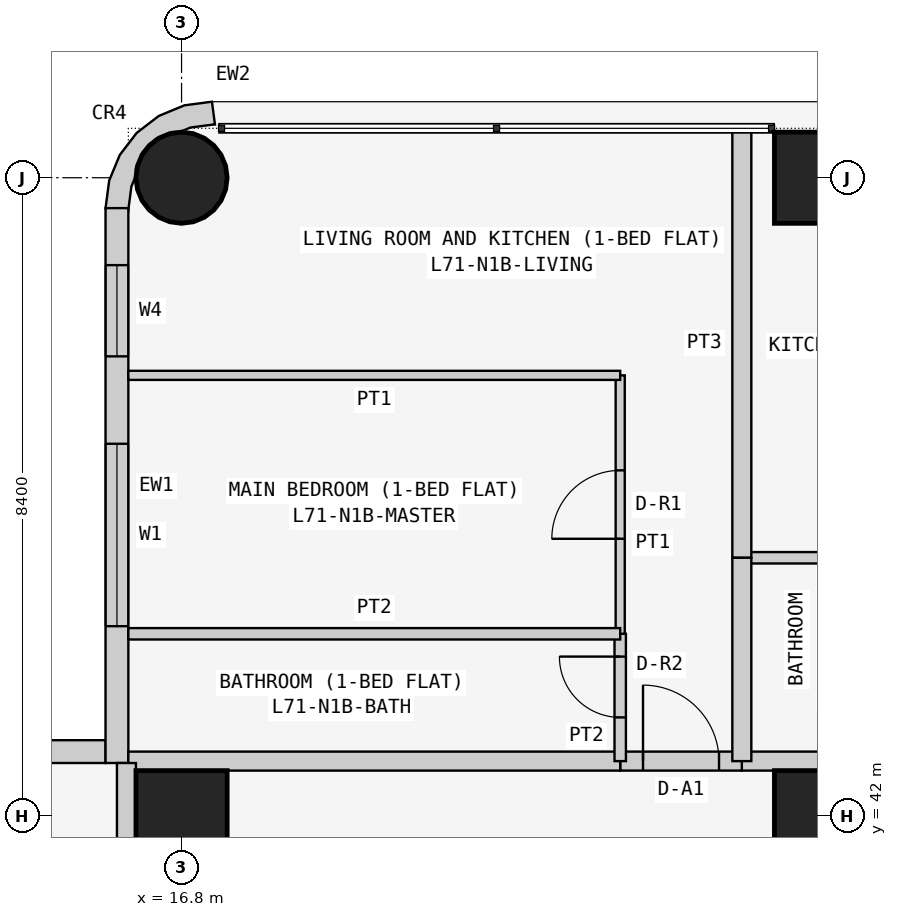
"""IFC4 building model, lengths in metres.
Left out: names, types, materials, properties, quantities, classifications, styles, units other than length and angle.
Written with IfcOpenShell. Run it as: python <this file> out.ifc"""

import sys

from ifc_helpers import new_model, si_unit, direction, frame, frame_2d, origin, origin_2d, place, context, subcontext, project, spatial, polyline, rectangle, circle, outline, extrude, element, fill, save


model = new_model("IFC4")
c1 = context("Model", 3, precision=1e-05, world=origin(), true_north=direction((0.0, 1.0)))
c2 = subcontext(c1, "Body", "Model", "MODEL_VIEW")
j1 = project(units=[si_unit("LENGTHUNIT", "METRE"), si_unit("PLANEANGLEUNIT", "RADIAN")], contexts=[c1])
p1 = place(None, origin())
s1 = spatial("IfcSite", under=j1, at=p1, CompositionType="ELEMENT")
p2 = place(p1, origin())
s2 = spatial("IfcBuilding", under=s1, at=p2, CompositionType="ELEMENT")
p3 = place(p2, frame((0.0, 0.0, 272.1)))
s3 = spatial("IfcBuildingStorey", under=s2, at=p3, CompositionType="ELEMENT", Elevation=272.1)
p4 = place(p3, frame((16.8, 42.0, 0.0), z_axis=(0.0, 0.0, 1.0), x_axis=(1.0, 0.0, 0.0)))
e1 = element("IfcColumn", 1, at=p4, inside=s3, PredefinedType="COLUMN", context=c2, shape_type="SweptSolid", body=[
    extrude(rectangle(XDim=1.2, YDim=1.2, at=origin_2d()), origin(), (0.0, 0.0, 1.0), 3.6),
])
p5 = place(p3, frame((16.8, 50.4, 0.0), z_axis=(0.0, 0.0, 1.0), x_axis=(1.0, 0.0, 0.0)))
e2 = element("IfcColumn", 2, at=p5, inside=s3, PredefinedType="COLUMN", context=c2, shape_type="SweptSolid", body=[
    extrude(circle(Radius=0.6, at=origin_2d()), origin(), (0.0, 0.0, 1.0), 3.6),
])
for number, where, z_axis, x_axis in (
    (3, (25.2, 42.0, 0.0), (0.0, 0.0, 1.0), (1.0, 0.0, 0.0)),
    (4, (25.2, 50.4, 0.0), (0.0, 0.0, 1.0), (1.0, 0.0, 0.0)),
):
    element("IfcColumn", number, at=place(p3, frame(where, z_axis=z_axis, x_axis=x_axis)), inside=s3, PredefinedType="COLUMN", context=c2, shape_type="SweptSolid", body=[
        extrude(rectangle(XDim=1.2, YDim=1.2, at=origin_2d()), origin(), (0.0, 0.0, 1.0), 3.6),
    ])
p6 = place(p3, frame((15.8, 42.85, 0.0), z_axis=(0.0, 0.0, 1.0), x_axis=(-1.0, 0.0, 0.0)))
e5 = element("IfcWall", 5, at=p6, inside=s3, PredefinedType="SOLIDWALL", context=c2, shape_type="SweptSolid", body=[
    extrude(rectangle(XDim=7.0, YDim=0.3, at=frame_2d((3.5, 0.0))), origin(), (0.0, 0.0, 1.0), 3.45),
])
p7 = place(p6, frame((1.5, 0.0, 0.9)))
e6 = element("IfcOpeningElement", 6, at=p7, cuts=e5, PredefinedType="OPENING", context=c2, shape_type="SweptSolid", body=[
    extrude(rectangle(XDim=2.4, YDim=1.5, at=frame_2d((1.2, 0.75))), frame((0.0, 0.16, 0.0), z_axis=(0.0, -1.0, 0.0), x_axis=(1.0, 0.0, 0.0)), (0.0, 0.0, 1.0), 0.32),
])
p8 = place(p6, frame((5.05, 0.0, 0.9)))
e7 = element("IfcOpeningElement", 7, at=p8, cuts=e5, PredefinedType="OPENING", context=c2, shape_type="SweptSolid", body=[
    extrude(rectangle(XDim=1.2, YDim=1.5, at=frame_2d((0.6, 0.75))), frame((0.0, 0.16, 0.0), z_axis=(0.0, -1.0, 0.0), x_axis=(1.0, 0.0, 0.0)), (0.0, 0.0, 1.0), 0.32),
])
p9 = place(p3, frame((15.95, 50.0, 0.0), z_axis=(0.0, 0.0, 1.0), x_axis=(0.0, -1.0, 0.0)))
e8 = element("IfcWall", 8, at=p9, inside=s3, PredefinedType="SOLIDWALL", context=c2, shape_type="SweptSolid", body=[
    extrude(rectangle(XDim=7.3, YDim=0.3, at=frame_2d((3.65, 0.0))), origin(), (0.0, 0.0, 1.0), 3.45),
])
p10 = place(p9, frame((3.1, 0.0, 0.9)))
e9 = element("IfcOpeningElement", 9, at=p10, cuts=e8, PredefinedType="OPENING", context=c2, shape_type="SweptSolid", body=[
    extrude(rectangle(XDim=2.4, YDim=1.5, at=frame_2d((1.2, 0.75))), frame((0.0, 0.16, 0.0), z_axis=(0.0, -1.0, 0.0), x_axis=(1.0, 0.0, 0.0)), (0.0, 0.0, 1.0), 0.32),
])
p11 = place(p9, frame((0.75, 0.0, 0.9)))
e10 = element("IfcOpeningElement", 10, at=p11, cuts=e8, PredefinedType="OPENING", context=c2, shape_type="SweptSolid", body=[
    extrude(rectangle(XDim=1.2, YDim=1.5, at=frame_2d((0.6, 0.75))), frame((0.0, 0.16, 0.0), z_axis=(0.0, -1.0, 0.0), x_axis=(1.0, 0.0, 0.0)), (0.0, 0.0, 1.0), 0.32),
])
p12 = place(p3, frame((17.162, 50.976, 0.0), z_axis=(0.0, 0.0, 1.0), x_axis=(-0.707106781187, 0.707106781187, 0.0)))
e11 = element("IfcWall", 11, at=p12, inside=s3, PredefinedType="SOLIDWALL", context=c2, shape_type="SweptSolid", body=[
    extrude(outline(polyline([(0.047, -0.129), (0.033, -0.143), (0.273, -0.327), (0.495, -0.037), (0.635, 0.301), (0.683, 0.663), (0.635, 1.025), (0.495, 1.363), (0.273, 1.653), (0.033, 1.469), (0.047, 1.455), (0.233, 1.212), (0.292, 1.069), (0.358, 1.003), (0.449, 0.782), (0.449, 0.543), (0.358, 0.322), (0.292, 0.257), (0.233, 0.114), (0.047, -0.129)])), origin(), (0.0, 0.0, 1.0), 3.45),
])
p13 = place(p3, frame((24.171, 42.725, 0.0), z_axis=(0.0, 0.0, 1.0), x_axis=(1.0, 0.0, 0.0)))
e12 = element("IfcWall", 12, at=p13, inside=s3, PredefinedType="PARTITIONING", context=c2, shape_type="SweptSolid", body=[
    extrude(rectangle(XDim=2.629, YDim=0.25, at=frame_2d((1.314, 0.0))), origin(), (0.0, 0.0, 1.0), 3.45),
])
p14 = place(p3, frame((22.571, 42.725, 0.0), z_axis=(0.0, 0.0, 1.0), x_axis=(1.0, 0.0, 0.0)))
e13 = element("IfcWall", 13, at=p14, inside=s3, PredefinedType="PARTITIONING", context=c2, shape_type="SweptSolid", body=[
    extrude(rectangle(XDim=1.6, YDim=0.25, at=frame_2d((0.8, 0.0))), origin(), (0.0, 0.0, 1.0), 3.45),
])
p15 = place(p14, frame((0.3, 0.0, 0.0)))
e14 = element("IfcOpeningElement", 14, at=p15, cuts=e13, PredefinedType="OPENING", context=c2, shape_type="SweptSolid", body=[
    extrude(rectangle(XDim=1.0, YDim=2.1, at=frame_2d((0.5, 1.05))), frame((0.0, 0.135, 0.0), z_axis=(0.0, -1.0, 0.0), x_axis=(1.0, 0.0, 0.0)), (0.0, 0.0, 1.0), 0.27),
])
p16 = place(p3, frame((16.1, 42.725, 0.0), z_axis=(0.0, 0.0, 1.0), x_axis=(1.0, 0.0, 0.0)))
e15 = element("IfcWall", 15, at=p16, inside=s3, PredefinedType="PARTITIONING", context=c2, shape_type="SweptSolid", body=[
    extrude(rectangle(XDim=6.471, YDim=0.25, at=frame_2d((3.235, 0.0))), origin(), (0.0, 0.0, 1.0), 3.45),
])
p17 = place(p3, frame((16.075, 35.829, 0.0), z_axis=(0.0, 0.0, 1.0), x_axis=(0.0, 1.0, 0.0)))
e16 = element("IfcWall", 16, at=p17, inside=s3, PredefinedType="PARTITIONING", context=c2, shape_type="SweptSolid", body=[
    extrude(rectangle(XDim=6.871, YDim=0.25, at=frame_2d((3.436, 0.0))), origin(), (0.0, 0.0, 1.0), 3.45),
])
p18 = place(p3, frame((26.8, 45.4, 0.0), z_axis=(0.0, 0.0, 1.0), x_axis=(-1.0, 0.0, 0.0)))
e17 = element("IfcWall", 17, at=p18, inside=s3, PredefinedType="PARTITIONING", context=c2, shape_type="SweptSolid", body=[
    extrude(rectangle(XDim=2.629, YDim=0.15, at=frame_2d((1.314, 0.0))), origin(), (0.0, 0.0, 1.0), 3.45),
])
p19 = place(p3, frame((24.171, 45.4, 0.0), z_axis=(0.0, 0.0, 1.0), x_axis=(0.0, 1.0, 0.0)))
e18 = element("IfcWall", 18, at=p19, inside=s3, PredefinedType="PARTITIONING", context=c2, shape_type="SweptSolid", body=[
    extrude(rectangle(XDim=5.65, YDim=0.25, at=frame_2d((2.825, 0.0))), origin(), (0.0, 0.0, 1.0), 3.45),
])
p20 = place(p3, frame((24.171, 45.4, 0.0), z_axis=(0.0, 0.0, 1.0), x_axis=(0.0, -1.0, 0.0)))
e19 = element("IfcWall", 19, at=p20, inside=s3, PredefinedType="PARTITIONING", context=c2, shape_type="SweptSolid", body=[
    extrude(rectangle(XDim=2.675, YDim=0.25, at=frame_2d((1.337, 0.0))), origin(), (0.0, 0.0, 1.0), 3.45),
])
p21 = place(p3, frame((22.571, 42.725, 0.0), z_axis=(0.0, 0.0, 1.0), x_axis=(0.0, 1.0, 0.0)))
e20 = element("IfcWall", 20, at=p21, inside=s3, PredefinedType="PARTITIONING", context=c2, shape_type="SweptSolid", body=[
    extrude(rectangle(XDim=1.675, YDim=0.15, at=frame_2d((0.837, 0.0))), origin(), (0.0, 0.0, 1.0), 3.45),
])
p22 = place(p21, frame((0.575, 0.0, 0.0)))
e21 = element("IfcOpeningElement", 21, at=p22, cuts=e20, PredefinedType="OPENING", context=c2, shape_type="SweptSolid", body=[
    extrude(rectangle(XDim=0.8, YDim=2.1, at=frame_2d((0.4, 1.05))), frame((0.0, 0.085, 0.0), z_axis=(0.0, -1.0, 0.0), x_axis=(1.0, 0.0, 0.0)), (0.0, 0.0, 1.0), 0.17),
])
p23 = place(p3, frame((22.571, 44.4, 0.0), z_axis=(0.0, 0.0, 1.0), x_axis=(0.0, 1.0, 0.0)))
e22 = element("IfcWall", 22, at=p23, inside=s3, PredefinedType="PARTITIONING", context=c2, shape_type="SweptSolid", body=[
    extrude(rectangle(XDim=3.4, YDim=0.12, at=frame_2d((1.7, 0.0))), origin(), (0.0, 0.0, 1.0), 3.45),
])
p24 = place(p23, frame((1.25, 0.0, 0.0)))
e23 = element("IfcOpeningElement", 23, at=p24, cuts=e22, PredefinedType="OPENING", context=c2, shape_type="SweptSolid", body=[
    extrude(rectangle(XDim=0.9, YDim=2.1, at=frame_2d((0.45, 1.05))), frame((0.0, 0.07, 0.0), z_axis=(0.0, -1.0, 0.0), x_axis=(1.0, 0.0, 0.0)), (0.0, 0.0, 1.0), 0.14),
])
p25 = place(p3, frame((22.571, 47.8, 0.0), z_axis=(0.0, 0.0, 1.0), x_axis=(-1.0, 0.0, 0.0)))
e24 = element("IfcWall", 24, at=p25, inside=s3, PredefinedType="PARTITIONING", context=c2, shape_type="SweptSolid", body=[
    extrude(rectangle(XDim=6.471, YDim=0.12, at=frame_2d((3.235, 0.0))), origin(), (0.0, 0.0, 1.0), 3.45),
])
p26 = place(p3, frame((22.571, 44.4, 0.0), z_axis=(0.0, 0.0, 1.0), x_axis=(-1.0, 0.0, 0.0)))
e25 = element("IfcWall", 25, at=p26, inside=s3, PredefinedType="PARTITIONING", context=c2, shape_type="SweptSolid", body=[
    extrude(rectangle(XDim=6.471, YDim=0.15, at=frame_2d((3.235, 0.0))), origin(), (0.0, 0.0, 1.0), 3.45),
])
p27 = place(p10, origin())
e26 = element("IfcWindow", 26, at=p27, inside=s3, PartitioningType="SINGLE_PANEL", PredefinedType="WINDOW", context=c2, shape_type="SweptSolid", body=[
    extrude(rectangle(XDim=2.4, YDim=1.5, at=frame_2d((1.2, 0.75))), frame((0.0, 0.03, 0.0), z_axis=(0.0, -1.0, 0.0), x_axis=(1.0, 0.0, 0.0)), (0.0, 0.0, 1.0), 0.06),
])
fill(e9, e26)
p28 = place(p11, origin())
e27 = element("IfcWindow", 27, at=p28, inside=s3, PartitioningType="SINGLE_PANEL", PredefinedType="WINDOW", context=c2, shape_type="SweptSolid", body=[
    extrude(rectangle(XDim=1.2, YDim=1.5, at=frame_2d((0.6, 0.75))), frame((0.0, 0.03, 0.0), z_axis=(0.0, -1.0, 0.0), x_axis=(1.0, 0.0, 0.0)), (0.0, 0.0, 1.0), 0.06),
])
fill(e10, e27)
p29 = place(p15, origin())
e28 = element("IfcDoor", 28, at=p29, inside=s3, OperationType="SINGLE_SWING_LEFT", PredefinedType="DOOR", context=c2, shape_type="SweptSolid", body=[
    extrude(rectangle(XDim=1.0, YDim=2.1, at=frame_2d((0.5, 1.05))), frame((0.0, 0.025, 0.0), z_axis=(0.0, -1.0, 0.0), x_axis=(1.0, 0.0, 0.0)), (0.0, 0.0, 1.0), 0.05),
])
fill(e14, e28)
p30 = place(p22, origin())
e29 = element("IfcDoor", 29, at=p30, inside=s3, OperationType="SINGLE_SWING_RIGHT", PredefinedType="DOOR", context=c2, shape_type="SweptSolid", body=[
    extrude(rectangle(XDim=0.8, YDim=2.1, at=frame_2d((0.4, 1.05))), frame((0.0, 0.025, 0.0), z_axis=(0.0, -1.0, 0.0), x_axis=(1.0, 0.0, 0.0)), (0.0, 0.0, 1.0), 0.05),
])
fill(e21, e29)
p31 = place(p24, origin())
e30 = element("IfcDoor", 30, at=p31, inside=s3, OperationType="SINGLE_SWING_LEFT", PredefinedType="DOOR", context=c2, shape_type="SweptSolid", body=[
    extrude(rectangle(XDim=0.9, YDim=2.1, at=frame_2d((0.45, 1.05))), frame((0.0, 0.025, 0.0), z_axis=(0.0, -1.0, 0.0), x_axis=(1.0, 0.0, 0.0)), (0.0, 0.0, 1.0), 0.05),
])
fill(e23, e30)
save(model, sys.argv[1])
